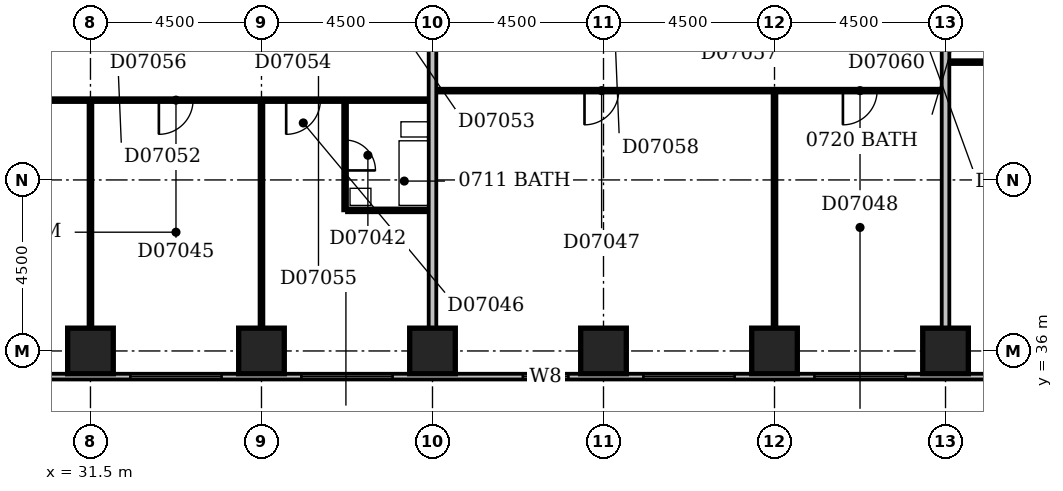
"""IFC4 building model, lengths in metres.
Left out: names, types, materials, properties, quantities, classifications, styles, units other than length and angle.
Written with IfcOpenShell. Run it as: python <this file> out.ifc"""

import sys

from ifc_helpers import new_model, si_unit, direction, frame, frame_2d, origin, origin_2d, place, context, subcontext, project, spatial, rectangle, extrude, element, fill, save


model = new_model("IFC4")
c1 = context("Model", 3, precision=1e-05, world=origin(), true_north=direction((0.0, 1.0)))
c2 = subcontext(c1, "Body", "Model", "MODEL_VIEW")
j1 = project(units=[si_unit("LENGTHUNIT", "METRE"), si_unit("PLANEANGLEUNIT", "RADIAN")], contexts=[c1])
p1 = place(None, origin())
s1 = spatial("IfcSite", under=j1, at=p1, CompositionType="ELEMENT")
p2 = place(p1, origin())
s2 = spatial("IfcBuilding", under=s1, at=p2, CompositionType="ELEMENT")
p3 = place(p2, frame((0.0, 0.0, 36.2)))
s3 = spatial("IfcBuildingStorey", under=s2, at=p3, CompositionType="ELEMENT", Elevation=36.2)
for number, where, z_axis, x_axis in (
    (1, (31.5, 36.0, -0.3), (0.0, 0.0, 1.0), (1.0, 0.0, 0.0)),
    (2, (36.0, 36.0, -0.3), (0.0, 0.0, 1.0), (1.0, 0.0, 0.0)),
    (3, (40.5, 36.0, -0.3), (0.0, 0.0, 1.0), (1.0, 0.0, 0.0)),
    (4, (45.0, 36.0, -0.3), (0.0, 0.0, 1.0), (1.0, 0.0, 0.0)),
    (5, (49.5, 36.0, -0.3), (0.0, 0.0, 1.0), (1.0, 0.0, 0.0)),
    (6, (54.0, 36.0, -0.3), (0.0, 0.0, 1.0), (1.0, 0.0, 0.0)),
):
    element("IfcColumn", number, at=place(p3, frame(where, z_axis=z_axis, x_axis=x_axis)), inside=s3, PredefinedType="COLUMN", context=c2, shape_type="SweptSolid", body=[
        extrude(rectangle(XDim=1.2, YDim=1.2, at=origin_2d()), origin(), (0.0, 0.0, 1.0), 3.6),
    ])
p4 = place(p3, frame((23.1, 35.325, 0.0), z_axis=(0.0, 0.0, 1.0), x_axis=(1.0, 0.0, 0.0)))
e7 = element("IfcWall", 7, at=p4, inside=s3, PredefinedType="STANDARD", context=c2, shape_type="SweptSolid", body=[
    extrude(rectangle(XDim=45.15, YDim=0.15, at=frame_2d((22.575, 0.0))), origin(), (0.0, 0.0, 1.0), 2.7),
])
p5 = place(p4, frame((0.45, 0.0, 0.6)))
e8 = element("IfcOpeningElement", 8, at=p5, cuts=e7, PredefinedType="OPENING", context=c2, shape_type="SweptSolid", body=[
    extrude(rectangle(XDim=2.4, YDim=1.8, at=frame_2d((1.2, 0.9))), frame((0.0, 0.087, 0.0), z_axis=(0.0, -1.0, 0.0), x_axis=(1.0, 0.0, 0.0)), (0.0, 0.0, 1.0), 0.174),
])
p6 = place(p4, frame((4.776, 0.0, 0.6)))
e9 = element("IfcOpeningElement", 9, at=p6, cuts=e7, PredefinedType="OPENING", context=c2, shape_type="SweptSolid", body=[
    extrude(rectangle(XDim=1.8, YDim=1.8, at=frame_2d((0.9, 0.9))), frame((0.0, 0.087, 0.0), z_axis=(0.0, -1.0, 0.0), x_axis=(1.0, 0.0, 0.0)), (0.0, 0.0, 1.0), 0.174),
])
p7 = place(p4, frame((9.45, 0.0, 0.6)))
e10 = element("IfcOpeningElement", 10, at=p7, cuts=e7, PredefinedType="OPENING", context=c2, shape_type="SweptSolid", body=[
    extrude(rectangle(XDim=2.4, YDim=1.8, at=frame_2d((1.2, 0.9))), frame((0.0, 0.087, 0.0), z_axis=(0.0, -1.0, 0.0), x_axis=(1.0, 0.0, 0.0)), (0.0, 0.0, 1.0), 0.174),
])
p8 = place(p4, frame((13.95, 0.0, 0.6)))
e11 = element("IfcOpeningElement", 11, at=p8, cuts=e7, PredefinedType="OPENING", context=c2, shape_type="SweptSolid", body=[
    extrude(rectangle(XDim=2.4, YDim=1.8, at=frame_2d((1.2, 0.9))), frame((0.0, 0.087, 0.0), z_axis=(0.0, -1.0, 0.0), x_axis=(1.0, 0.0, 0.0)), (0.0, 0.0, 1.0), 0.174),
])
p9 = place(p4, frame((19.777, 0.0, 0.6)))
e12 = element("IfcOpeningElement", 12, at=p9, cuts=e7, PredefinedType="OPENING", context=c2, shape_type="SweptSolid", body=[
    extrude(rectangle(XDim=1.2, YDim=1.8, at=frame_2d((0.6, 0.9))), frame((0.0, 0.087, 0.0), z_axis=(0.0, -1.0, 0.0), x_axis=(1.0, 0.0, 0.0)), (0.0, 0.0, 1.0), 0.174),
])
p10 = place(p4, frame((22.95, 0.0, 0.6)))
e13 = element("IfcOpeningElement", 13, at=p10, cuts=e7, PredefinedType="OPENING", context=c2, shape_type="SweptSolid", body=[
    extrude(rectangle(XDim=2.4, YDim=1.8, at=frame_2d((1.2, 0.9))), frame((0.0, 0.087, 0.0), z_axis=(0.0, -1.0, 0.0), x_axis=(1.0, 0.0, 0.0)), (0.0, 0.0, 1.0), 0.174),
])
p11 = place(p4, frame((27.45, 0.0, 0.6)))
e14 = element("IfcOpeningElement", 14, at=p11, cuts=e7, PredefinedType="OPENING", context=c2, shape_type="SweptSolid", body=[
    extrude(rectangle(XDim=2.4, YDim=1.8, at=frame_2d((1.2, 0.9))), frame((0.0, 0.087, 0.0), z_axis=(0.0, -1.0, 0.0), x_axis=(1.0, 0.0, 0.0)), (0.0, 0.0, 1.0), 0.174),
])
p12 = place(p4, frame((31.95, 0.0, 0.6)))
e15 = element("IfcOpeningElement", 15, at=p12, cuts=e7, PredefinedType="OPENING", context=c2, shape_type="SweptSolid", body=[
    extrude(rectangle(XDim=2.4, YDim=1.8, at=frame_2d((1.2, 0.9))), frame((0.0, 0.087, 0.0), z_axis=(0.0, -1.0, 0.0), x_axis=(1.0, 0.0, 0.0)), (0.0, 0.0, 1.0), 0.174),
])
p13 = place(p4, frame((37.894, 0.0, 0.6)))
e16 = element("IfcOpeningElement", 16, at=p13, cuts=e7, PredefinedType="OPENING", context=c2, shape_type="SweptSolid", body=[
    extrude(rectangle(XDim=1.2, YDim=1.8, at=frame_2d((0.6, 0.9))), frame((0.0, 0.087, 0.0), z_axis=(0.0, -1.0, 0.0), x_axis=(1.0, 0.0, 0.0)), (0.0, 0.0, 1.0), 0.174),
])
p14 = place(p4, frame((40.95, 0.0, 0.6)))
e17 = element("IfcOpeningElement", 17, at=p14, cuts=e7, PredefinedType="OPENING", context=c2, shape_type="SweptSolid", body=[
    extrude(rectangle(XDim=2.4, YDim=1.8, at=frame_2d((1.2, 0.9))), frame((0.0, 0.087, 0.0), z_axis=(0.0, -1.0, 0.0), x_axis=(1.0, 0.0, 0.0)), (0.0, 0.0, 1.0), 0.174),
])
p15 = place(p3, frame((31.5, 36.6, 0.0), z_axis=(0.0, 0.0, 1.0), x_axis=(0.0, 1.0, 0.0)))
e18 = element("IfcWall", 18, at=p15, inside=s3, PredefinedType="PARTITIONING", context=c2, shape_type="SweptSolid", body=[
    extrude(rectangle(XDim=5.95, YDim=0.1, at=frame_2d((2.975, 0.0))), origin(), (0.0, 0.0, 1.0), 3.3),
])
p16 = place(p3, frame((36.0, 36.6, 0.0), z_axis=(0.0, 0.0, 1.0), x_axis=(0.0, 1.0, 0.0)))
e19 = element("IfcWall", 19, at=p16, inside=s3, PredefinedType="PARTITIONING", context=c2, shape_type="SweptSolid", body=[
    extrude(rectangle(XDim=5.95, YDim=0.1, at=frame_2d((2.975, 0.0))), origin(), (0.0, 0.0, 1.0), 2.4),
])
p17 = place(p3, frame((40.5, 36.6, 0.0), z_axis=(0.0, 0.0, 1.0), x_axis=(0.0, 1.0, 0.0)))
e20 = element("IfcWall", 20, at=p17, inside=s3, PredefinedType="PARTITIONING", context=c2, shape_type="SweptSolid", body=[
    extrude(rectangle(XDim=12.8, YDim=0.2, at=frame_2d((6.4, 0.0))), origin(), (0.0, 0.0, 1.0), 3.3),
])
p18 = place(p3, frame((49.5, 36.6, 0.0), z_axis=(0.0, 0.0, 1.0), x_axis=(0.0, 1.0, 0.0)))
e21 = element("IfcWall", 21, at=p18, inside=s3, PredefinedType="PARTITIONING", context=c2, shape_type="SweptSolid", body=[
    extrude(rectangle(XDim=6.2, YDim=0.1, at=frame_2d((3.1, 0.0))), origin(), (0.0, 0.0, 1.0), 3.3),
])
p19 = place(p3, frame((54.0, 36.6, 0.0), z_axis=(0.0, 0.0, 1.0), x_axis=(0.0, 1.0, 0.0)))
e22 = element("IfcWall", 22, at=p19, inside=s3, PredefinedType="PARTITIONING", context=c2, shape_type="SweptSolid", body=[
    extrude(rectangle(XDim=12.8, YDim=0.2, at=frame_2d((6.4, 0.0))), origin(), (0.0, 0.0, 1.0), 2.6),
])
p20 = place(p3, frame((38.2, 39.7, 0.0), z_axis=(0.0, 0.0, 1.0), x_axis=(0.0, 1.0, 0.0)))
e23 = element("IfcWall", 23, at=p20, inside=s3, PredefinedType="PLUMBINGWALL", context=c2, shape_type="SweptSolid", body=[
    extrude(rectangle(XDim=2.85, YDim=0.1, at=frame_2d((1.425, 0.0))), origin(), (0.0, 0.0, 1.0), 3.3),
])
p21 = place(p20, frame((1.05, 0.0, 0.0)))
e24 = element("IfcOpeningElement", 24, at=p21, cuts=e23, PredefinedType="OPENING", context=c2, shape_type="SweptSolid", body=[
    extrude(rectangle(XDim=0.8, YDim=2.1, at=frame_2d((0.4, 1.05))), frame((0.0, 0.062, 0.0), z_axis=(0.0, -1.0, 0.0), x_axis=(1.0, 0.0, 0.0)), (0.0, 0.0, 1.0), 0.124),
])
p22 = place(p3, frame((38.25, 39.7, 0.0), z_axis=(0.0, 0.0, 1.0), x_axis=(1.0, 0.0, 0.0)))
e25 = element("IfcWall", 25, at=p22, inside=s3, PredefinedType="PLUMBINGWALL", context=c2, shape_type="SweptSolid", body=[
    extrude(rectangle(XDim=2.15, YDim=0.1, at=frame_2d((1.075, 0.0))), origin(), (0.0, 0.0, 1.0), 3.3),
])
p23 = place(p3, frame((22.6, 42.6, 0.0), z_axis=(0.0, 0.0, 1.0), x_axis=(1.0, 0.0, 0.0)))
e26 = element("IfcWall", 26, at=p23, inside=s3, PredefinedType="PARTITIONING", context=c2, shape_type="SweptSolid", body=[
    extrude(rectangle(XDim=17.8, YDim=0.1, at=frame_2d((8.9, 0.0))), origin(), (0.0, 0.0, 1.0), 3.3),
])
p24 = place(p23, frame((3.9, 0.0, 0.0)))
e27 = element("IfcOpeningElement", 27, at=p24, cuts=e26, PredefinedType="OPENING", context=c2, shape_type="SweptSolid", body=[
    extrude(rectangle(XDim=0.9, YDim=2.1, at=frame_2d((0.45, 1.05))), frame((0.0, 0.062, 0.0), z_axis=(0.0, -1.0, 0.0), x_axis=(1.0, 0.0, 0.0)), (0.0, 0.0, 1.0), 0.124),
])
p25 = place(p23, frame((10.7, 0.0, 0.0)))
e28 = element("IfcOpeningElement", 28, at=p25, cuts=e26, PredefinedType="OPENING", context=c2, shape_type="SweptSolid", body=[
    extrude(rectangle(XDim=0.9, YDim=2.1, at=frame_2d((0.45, 1.05))), frame((0.0, 0.062, 0.0), z_axis=(0.0, -1.0, 0.0), x_axis=(1.0, 0.0, 0.0)), (0.0, 0.0, 1.0), 0.124),
])
p26 = place(p23, frame((14.05, 0.0, 0.0)))
e29 = element("IfcOpeningElement", 29, at=p26, cuts=e26, PredefinedType="OPENING", context=c2, shape_type="SweptSolid", body=[
    extrude(rectangle(XDim=0.9, YDim=2.1, at=frame_2d((0.45, 1.05))), frame((0.0, 0.062, 0.0), z_axis=(0.0, -1.0, 0.0), x_axis=(1.0, 0.0, 0.0)), (0.0, 0.0, 1.0), 0.124),
])
p27 = place(p3, frame((40.6, 42.85, 0.0), z_axis=(0.0, 0.0, 1.0), x_axis=(1.0, 0.0, 0.0)))
e30 = element("IfcWall", 30, at=p27, inside=s3, PredefinedType="PARTITIONING", context=c2, shape_type="SweptSolid", body=[
    extrude(rectangle(XDim=13.3, YDim=0.1, at=frame_2d((6.65, 0.0))), origin(), (0.0, 0.0, 1.0), 3.3),
])
p28 = place(p27, frame((3.9, 0.0, 0.0)))
e31 = element("IfcOpeningElement", 31, at=p28, cuts=e30, PredefinedType="OPENING", context=c2, shape_type="SweptSolid", body=[
    extrude(rectangle(XDim=0.9, YDim=2.1, at=frame_2d((0.45, 1.05))), frame((0.0, 0.062, 0.0), z_axis=(0.0, -1.0, 0.0), x_axis=(1.0, 0.0, 0.0)), (0.0, 0.0, 1.0), 0.124),
])
p29 = place(p27, frame((10.7, 0.0, 0.0)))
e32 = element("IfcOpeningElement", 32, at=p29, cuts=e30, PredefinedType="OPENING", context=c2, shape_type="SweptSolid", body=[
    extrude(rectangle(XDim=0.9, YDim=2.1, at=frame_2d((0.45, 1.05))), frame((0.0, 0.062, 0.0), z_axis=(0.0, -1.0, 0.0), x_axis=(1.0, 0.0, 0.0)), (0.0, 0.0, 1.0), 0.124),
])
p30 = place(p3, frame((54.1, 43.6, 0.0), z_axis=(0.0, 0.0, 1.0), x_axis=(1.0, 0.0, 0.0)))
e33 = element("IfcWall", 33, at=p30, inside=s3, PredefinedType="PARTITIONING", context=c2, shape_type="SweptSolid", body=[
    extrude(rectangle(XDim=8.8, YDim=0.1, at=frame_2d((4.4, 0.0))), origin(), (0.0, 0.0, 1.0), 3.3),
])
p31 = place(p30, frame((1.7, 0.0, 0.0)))
e34 = element("IfcOpeningElement", 34, at=p31, cuts=e33, PredefinedType="OPENING", context=c2, shape_type="SweptSolid", body=[
    extrude(rectangle(XDim=0.9, YDim=2.1, at=frame_2d((0.45, 1.05))), frame((0.0, 0.062, 0.0), z_axis=(0.0, -1.0, 0.0), x_axis=(1.0, 0.0, 0.0)), (0.0, 0.0, 1.0), 0.124),
])
p32 = place(p30, frame((6.2, 0.0, 0.0)))
e35 = element("IfcOpeningElement", 35, at=p32, cuts=e33, PredefinedType="OPENING", context=c2, shape_type="SweptSolid", body=[
    extrude(rectangle(XDim=0.9, YDim=2.1, at=frame_2d((0.45, 1.05))), frame((0.0, 0.062, 0.0), z_axis=(0.0, -1.0, 0.0), x_axis=(1.0, 0.0, 0.0)), (0.0, 0.0, 1.0), 0.124),
])
p33 = place(p7, origin())
e36 = element("IfcWindow", 36, at=p33, inside=s3, PartitioningType="SINGLE_PANEL", PredefinedType="WINDOW", context=c2, shape_type="SweptSolid", body=[
    extrude(rectangle(XDim=2.4, YDim=1.8, at=frame_2d((1.2, 0.9))), frame((0.0, 0.03, 0.0), z_axis=(0.0, -1.0, 0.0), x_axis=(1.0, 0.0, 0.0)), (0.0, 0.0, 1.0), 0.06),
])
fill(e10, e36)
p34 = place(p8, origin())
e37 = element("IfcWindow", 37, at=p34, inside=s3, PartitioningType="SINGLE_PANEL", PredefinedType="WINDOW", context=c2, shape_type="SweptSolid", body=[
    extrude(rectangle(XDim=2.4, YDim=1.8, at=frame_2d((1.2, 0.9))), frame((0.0, 0.03, 0.0), z_axis=(0.0, -1.0, 0.0), x_axis=(1.0, 0.0, 0.0)), (0.0, 0.0, 1.0), 0.06),
])
fill(e11, e37)
p35 = place(p9, origin())
e38 = element("IfcWindow", 38, at=p35, inside=s3, PartitioningType="SINGLE_PANEL", PredefinedType="WINDOW", context=c2, shape_type="SweptSolid", body=[
    extrude(rectangle(XDim=1.2, YDim=1.8, at=frame_2d((0.6, 0.9))), frame((0.0, 0.03, 0.0), z_axis=(0.0, -1.0, 0.0), x_axis=(1.0, 0.0, 0.0)), (0.0, 0.0, 1.0), 0.06),
])
fill(e12, e38)
p36 = place(p10, origin())
e39 = element("IfcWindow", 39, at=p36, inside=s3, PartitioningType="SINGLE_PANEL", PredefinedType="WINDOW", context=c2, shape_type="SweptSolid", body=[
    extrude(rectangle(XDim=2.4, YDim=1.8, at=frame_2d((1.2, 0.9))), frame((0.0, 0.03, 0.0), z_axis=(0.0, -1.0, 0.0), x_axis=(1.0, 0.0, 0.0)), (0.0, 0.0, 1.0), 0.06),
])
fill(e13, e39)
p37 = place(p11, origin())
e40 = element("IfcWindow", 40, at=p37, inside=s3, PartitioningType="SINGLE_PANEL", PredefinedType="WINDOW", context=c2, shape_type="SweptSolid", body=[
    extrude(rectangle(XDim=2.4, YDim=1.8, at=frame_2d((1.2, 0.9))), frame((0.0, 0.03, 0.0), z_axis=(0.0, -1.0, 0.0), x_axis=(1.0, 0.0, 0.0)), (0.0, 0.0, 1.0), 0.06),
])
fill(e14, e40)
p38 = place(p21, frame((0.8, 0.0, 0.0), z_axis=(0.0, 0.0, 1.0), x_axis=(-1.0, 0.0, 0.0)))
e41 = element("IfcDoor", 41, at=p38, inside=s3, OperationType="SINGLE_SWING_RIGHT", PredefinedType="DOOR", context=c2, shape_type="SweptSolid", body=[
    extrude(rectangle(XDim=0.8, YDim=2.1, at=frame_2d((0.4, 1.05))), frame((0.0, 0.025, 0.0), z_axis=(0.0, -1.0, 0.0), x_axis=(1.0, 0.0, 0.0)), (0.0, 0.0, 1.0), 0.05),
])
fill(e24, e41)
p39 = place(p25, frame((0.9, 0.0, 0.0), z_axis=(0.0, 0.0, 1.0), x_axis=(-1.0, 0.0, 0.0)))
e42 = element("IfcDoor", 42, at=p39, inside=s3, OperationType="SINGLE_SWING_RIGHT", PredefinedType="DOOR", context=c2, shape_type="SweptSolid", body=[
    extrude(rectangle(XDim=0.9, YDim=2.1, at=frame_2d((0.45, 1.05))), frame((0.0, 0.025, 0.0), z_axis=(0.0, -1.0, 0.0), x_axis=(1.0, 0.0, 0.0)), (0.0, 0.0, 1.0), 0.05),
])
fill(e28, e42)
p40 = place(p26, frame((0.9, 0.0, 0.0), z_axis=(0.0, 0.0, 1.0), x_axis=(-1.0, 0.0, 0.0)))
e43 = element("IfcDoor", 43, at=p40, inside=s3, OperationType="SINGLE_SWING_RIGHT", PredefinedType="DOOR", context=c2, shape_type="SweptSolid", body=[
    extrude(rectangle(XDim=0.9, YDim=2.1, at=frame_2d((0.45, 1.05))), frame((0.0, 0.025, 0.0), z_axis=(0.0, -1.0, 0.0), x_axis=(1.0, 0.0, 0.0)), (0.0, 0.0, 1.0), 0.05),
])
fill(e29, e43)
p41 = place(p28, frame((0.9, 0.0, 0.0), z_axis=(0.0, 0.0, 1.0), x_axis=(-1.0, 0.0, 0.0)))
e44 = element("IfcDoor", 44, at=p41, inside=s3, OperationType="SINGLE_SWING_RIGHT", PredefinedType="DOOR", context=c2, shape_type="SweptSolid", body=[
    extrude(rectangle(XDim=0.9, YDim=2.1, at=frame_2d((0.45, 1.05))), frame((0.0, 0.025, 0.0), z_axis=(0.0, -1.0, 0.0), x_axis=(1.0, 0.0, 0.0)), (0.0, 0.0, 1.0), 0.05),
])
fill(e31, e44)
p42 = place(p29, frame((0.9, 0.0, 0.0), z_axis=(0.0, 0.0, 1.0), x_axis=(-1.0, 0.0, 0.0)))
e45 = element("IfcDoor", 45, at=p42, inside=s3, OperationType="SINGLE_SWING_RIGHT", PredefinedType="DOOR", context=c2, shape_type="SweptSolid", body=[
    extrude(rectangle(XDim=0.9, YDim=2.1, at=frame_2d((0.45, 1.05))), frame((0.0, 0.025, 0.0), z_axis=(0.0, -1.0, 0.0), x_axis=(1.0, 0.0, 0.0)), (0.0, 0.0, 1.0), 0.05),
])
fill(e32, e45)
save(model, sys.argv[1])
